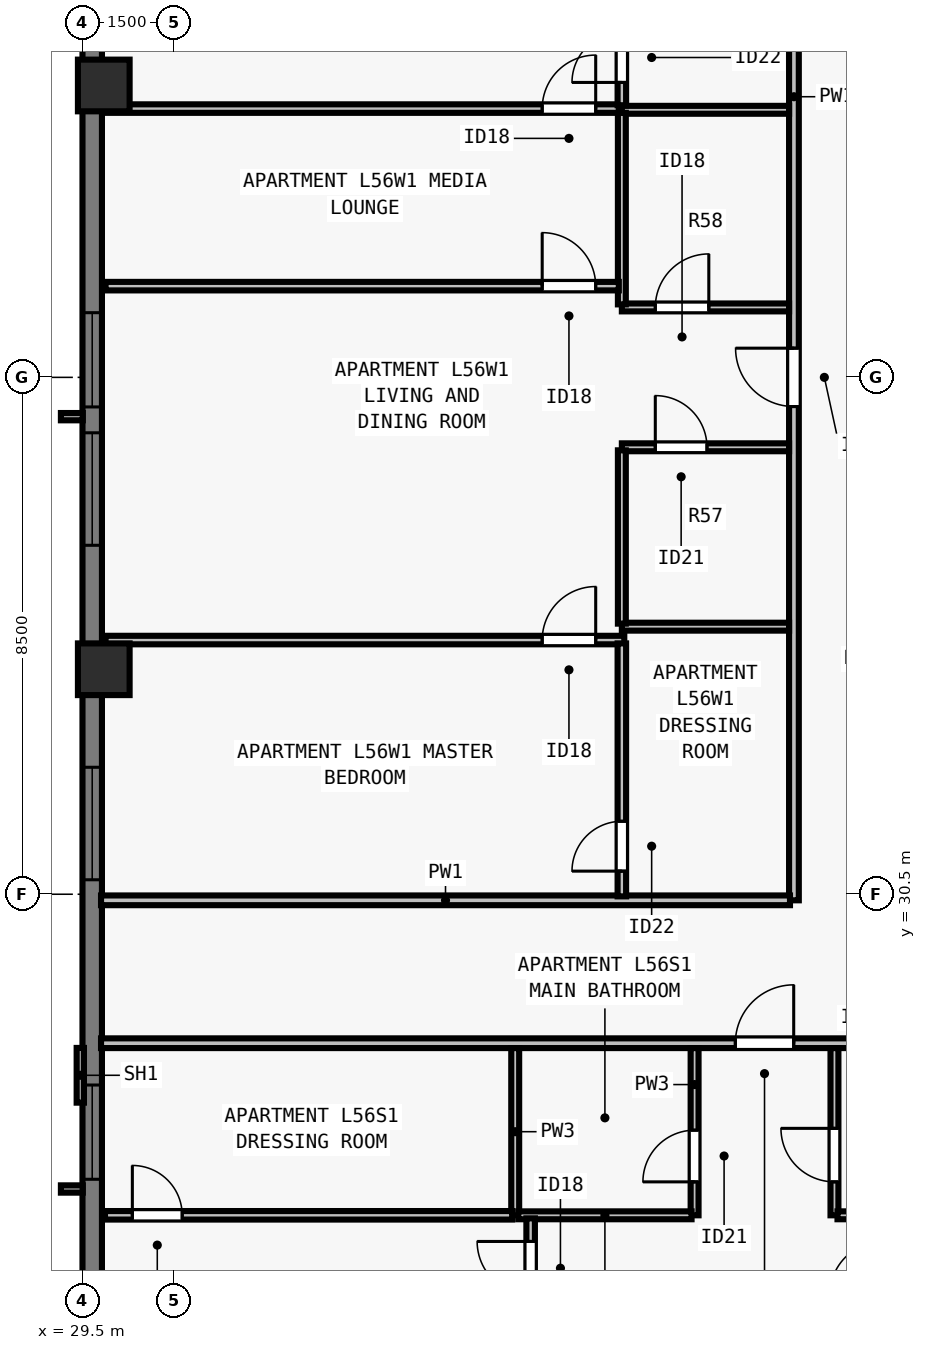
"""IFC4 building model, lengths in metres.
Left out: names, types, materials, properties, quantities, classifications, styles, units other than length and angle.
Written with IfcOpenShell. Run it as: python <this file> out.ifc"""

import sys

from ifc_helpers import new_model, si_unit, direction, frame, frame_2d, origin, origin_2d, place, context, subcontext, project, spatial, rectangle, extrude, element, fill, save


model = new_model("IFC4")
c1 = context("Model", 3, precision=1e-05, world=origin(), true_north=direction((0.0, 1.0)))
c2 = subcontext(c1, "Body", "Model", "MODEL_VIEW")
j1 = project(units=[si_unit("LENGTHUNIT", "METRE"), si_unit("PLANEANGLEUNIT", "RADIAN")], contexts=[c1])
p1 = place(None, origin())
s1 = spatial("IfcSite", under=j1, at=p1, CompositionType="ELEMENT")
p2 = place(p1, origin())
s2 = spatial("IfcBuilding", under=s1, at=p2, CompositionType="ELEMENT")
p3 = place(p2, frame((0.0, 0.0, 206.0)))
s3 = spatial("IfcBuildingStorey", under=s2, at=p3, CompositionType="ELEMENT", Elevation=206.0)
for number, where, z_axis, x_axis in (
    (1, (29.85, 43.8, 0.0), (0.0, 0.0, 1.0), (0.0, 1.0, 0.0)),
    (2, (29.85, 34.2, 0.0), (0.0, 0.0, 1.0), (0.0, 1.0, 0.0)),
):
    element("IfcColumn", number, at=place(p3, frame(where, z_axis=z_axis, x_axis=x_axis)), inside=s3, PredefinedType="COLUMN", context=c2, shape_type="SweptSolid", body=[
        extrude(rectangle(XDim=0.85, YDim=0.85, at=origin_2d()), origin(), (0.0, 0.0, 1.0), 3.5),
    ])
p4 = place(p3, frame((29.66, 21.5, 0.0), z_axis=(0.0, 0.0, 1.0), x_axis=(0.0, 1.0, 0.0)))
e3 = element("IfcWall", 3, at=p4, inside=s3, PredefinedType="SOLIDWALL", context=c2, shape_type="SweptSolid", body=[
    extrude(rectangle(XDim=34.702, YDim=0.32, at=frame_2d((17.351, 0.0))), origin(), (0.0, 0.0, 1.0), 3.29),
])
p5 = place(p4, frame((4.312, 0.0, 0.8)))
e4 = element("IfcOpeningElement", 4, at=p5, cuts=e3, PredefinedType="OPENING", context=c2, shape_type="SweptSolid", body=[
    extrude(rectangle(XDim=1.55, YDim=1.678, at=frame_2d((0.775, 0.839))), frame((0.0, 0.17, 0.0), z_axis=(0.0, -1.0, 0.0), x_axis=(1.0, 0.0, 0.0)), (0.0, 0.0, 1.0), 0.34),
])
p6 = place(p4, frame((9.238, 0.0, 0.8)))
e5 = element("IfcOpeningElement", 5, at=p6, cuts=e3, PredefinedType="OPENING", context=c2, shape_type="SweptSolid", body=[
    extrude(rectangle(XDim=1.85, YDim=1.678, at=frame_2d((0.925, 0.839))), frame((0.0, 0.17, 0.0), z_axis=(0.0, -1.0, 0.0), x_axis=(1.0, 0.0, 0.0)), (0.0, 0.0, 1.0), 0.34),
])
p7 = place(p4, frame((14.738, 0.0, 0.8)))
e6 = element("IfcOpeningElement", 6, at=p7, cuts=e3, PredefinedType="OPENING", context=c2, shape_type="SweptSolid", body=[
    extrude(rectangle(XDim=1.85, YDim=1.678, at=frame_2d((0.925, 0.839))), frame((0.0, 0.17, 0.0), z_axis=(0.0, -1.0, 0.0), x_axis=(1.0, 0.0, 0.0)), (0.0, 0.0, 1.0), 0.34),
])
p8 = place(p4, frame((17.014, 0.0, 0.8)))
e7 = element("IfcOpeningElement", 7, at=p8, cuts=e3, PredefinedType="OPENING", context=c2, shape_type="SweptSolid", body=[
    extrude(rectangle(XDim=1.55, YDim=1.678, at=frame_2d((0.775, 0.839))), frame((0.0, 0.17, 0.0), z_axis=(0.0, -1.0, 0.0), x_axis=(1.0, 0.0, 0.0)), (0.0, 0.0, 1.0), 0.34),
])
p9 = place(p4, frame((24.164, 0.0, 0.8)))
e8 = element("IfcOpeningElement", 8, at=p9, cuts=e3, PredefinedType="OPENING", context=c2, shape_type="SweptSolid", body=[
    extrude(rectangle(XDim=1.55, YDim=1.678, at=frame_2d((0.775, 0.839))), frame((0.0, 0.17, 0.0), z_axis=(0.0, -1.0, 0.0), x_axis=(1.0, 0.0, 0.0)), (0.0, 0.0, 1.0), 0.34),
])
p10 = place(p3, frame((29.805, 28.05, 0.0), z_axis=(0.0, 0.0, 1.0), x_axis=(1.0, 0.0, 0.0)))
e9 = element("IfcWall", 9, at=p10, inside=s3, PredefinedType="PARTITIONING", context=c2, shape_type="SweptSolid", body=[
    extrude(rectangle(XDim=44.39, YDim=0.16, at=frame_2d((22.195, 0.0))), origin(), (0.0, 0.0, 1.0), 2.958),
])
p11 = place(p10, frame((10.431, 0.0, 0.0)))
e10 = element("IfcOpeningElement", 10, at=p11, cuts=e9, PredefinedType="OPENING", context=c2, shape_type="SweptSolid", body=[
    extrude(rectangle(XDim=0.96, YDim=2.18, at=frame_2d((0.48, 1.09))), frame((0.0, 0.09, 0.0), z_axis=(0.0, -1.0, 0.0), x_axis=(1.0, 0.0, 0.0)), (0.0, 0.0, 1.0), 0.18),
])
p12 = place(p10, frame((32.511, 0.0, 0.0)))
e11 = element("IfcOpeningElement", 11, at=p12, cuts=e9, PredefinedType="OPENING", context=c2, shape_type="SweptSolid", body=[
    extrude(rectangle(XDim=0.96, YDim=2.18, at=frame_2d((0.48, 1.09))), frame((0.0, 0.09, 0.0), z_axis=(0.0, -1.0, 0.0), x_axis=(1.0, 0.0, 0.0)), (0.0, 0.0, 1.0), 0.18),
])
p13 = place(p3, frame((41.2, 30.4, 0.0), z_axis=(0.0, 0.0, 1.0), x_axis=(0.0, 1.0, 0.0)))
e12 = element("IfcWall", 12, at=p13, inside=s3, PredefinedType="PARTITIONING", context=c2, shape_type="SweptSolid", body=[
    extrude(rectangle(XDim=17.2, YDim=0.16, at=frame_2d((8.6, 0.0))), origin(), (0.0, 0.0, 1.0), 3.29),
])
p14 = place(p13, frame((8.12, 0.0, 0.0)))
e13 = element("IfcOpeningElement", 13, at=p14, cuts=e12, PredefinedType="OPENING", context=c2, shape_type="SweptSolid", body=[
    extrude(rectangle(XDim=0.96, YDim=2.18, at=frame_2d((0.48, 1.09))), frame((0.0, 0.09, 0.0), z_axis=(0.0, -1.0, 0.0), x_axis=(1.0, 0.0, 0.0)), (0.0, 0.0, 1.0), 0.18),
])
p15 = place(p3, frame((29.805, 30.4, 0.0), z_axis=(0.0, 0.0, 1.0), x_axis=(1.0, 0.0, 0.0)))
e14 = element("IfcWall", 14, at=p15, inside=s3, PredefinedType="PARTITIONING", context=c2, shape_type="SweptSolid", body=[
    extrude(rectangle(XDim=11.33, YDim=0.16, at=frame_2d((5.665, 0.0))), origin(), (0.0, 0.0, 1.0), 3.29),
])
p16 = place(p3, frame((36.616, 25.22, 0.0), z_axis=(0.0, 0.0, 1.0), x_axis=(0.0, 1.0, 0.0)))
e15 = element("IfcWall", 15, at=p16, inside=s3, PredefinedType="PLUMBINGWALL", context=c2, shape_type="SweptSolid", body=[
    extrude(rectangle(XDim=2.75, YDim=0.13, at=frame_2d((1.375, 0.0))), origin(), (0.0, 0.0, 1.0), 3.29),
])
p17 = place(p3, frame((39.566, 25.22, 0.0), z_axis=(0.0, 0.0, 1.0), x_axis=(0.0, 1.0, 0.0)))
e16 = element("IfcWall", 16, at=p17, inside=s3, PredefinedType="PLUMBINGWALL", context=c2, shape_type="SweptSolid", body=[
    extrude(rectangle(XDim=2.75, YDim=0.13, at=frame_2d((1.375, 0.0))), origin(), (0.0, 0.0, 1.0), 3.29),
])
p18 = place(p17, frame((0.55, 0.0, 0.0)))
e17 = element("IfcOpeningElement", 17, at=p18, cuts=e16, PredefinedType="OPENING", context=c2, shape_type="SweptSolid", body=[
    extrude(rectangle(XDim=0.85, YDim=2.08, at=frame_2d((0.425, 1.04))), frame((0.0, 0.075, 0.0), z_axis=(0.0, -1.0, 0.0), x_axis=(1.0, 0.0, 0.0)), (0.0, 0.0, 1.0), 0.15),
])
p19 = place(p3, frame((36.666, 25.22, 0.0), z_axis=(0.0, 0.0, 1.0), x_axis=(1.0, 0.0, 0.0)))
e18 = element("IfcWall", 18, at=p19, inside=s3, PredefinedType="PLUMBINGWALL", context=c2, shape_type="SweptSolid", body=[
    extrude(rectangle(XDim=2.85, YDim=0.13, at=frame_2d((1.425, 0.0))), origin(), (0.0, 0.0, 1.0), 3.29),
])
p20 = place(p3, frame((41.866, 25.22, 0.0), z_axis=(0.0, 0.0, 1.0), x_axis=(0.0, 1.0, 0.0)))
e19 = element("IfcWall", 19, at=p20, inside=s3, PredefinedType="PLUMBINGWALL", context=c2, shape_type="SweptSolid", body=[
    extrude(rectangle(XDim=2.75, YDim=0.13, at=frame_2d((1.375, 0.0))), origin(), (0.0, 0.0, 1.0), 2.573),
])
p21 = place(p20, frame((0.55, 0.0, 0.0)))
e20 = element("IfcOpeningElement", 20, at=p21, cuts=e19, PredefinedType="OPENING", context=c2, shape_type="SweptSolid", body=[
    extrude(rectangle(XDim=0.88, YDim=2.1, at=frame_2d((0.44, 1.05))), frame((0.0, 0.075, 0.0), z_axis=(0.0, -1.0, 0.0), x_axis=(1.0, 0.0, 0.0)), (0.0, 0.0, 1.0), 0.15),
])
p22 = place(p3, frame((41.916, 25.22, 0.0), z_axis=(0.0, 0.0, 1.0), x_axis=(1.0, 0.0, 0.0)))
e21 = element("IfcWall", 21, at=p22, inside=s3, PredefinedType="PLUMBINGWALL", context=c2, shape_type="SweptSolid", body=[
    extrude(rectangle(XDim=3.15, YDim=0.13, at=frame_2d((1.575, 0.0))), origin(), (0.0, 0.0, 1.0), 3.29),
])
p23 = place(p3, frame((36.87, 16.88, 0.0), z_axis=(0.0, 0.0, 1.0), x_axis=(0.0, 1.0, 0.0)))
e22 = element("IfcWall", 22, at=p23, inside=s3, PredefinedType="PARTITIONING", context=c2, shape_type="SweptSolid", body=[
    extrude(rectangle(XDim=8.29, YDim=0.14, at=frame_2d((4.145, 0.0))), origin(), (0.0, 0.0, 1.0), 2.573),
])
p24 = place(p23, frame((7.03, 0.0, 0.0)))
e23 = element("IfcOpeningElement", 23, at=p24, cuts=e22, PredefinedType="OPENING", context=c2, shape_type="SweptSolid", body=[
    extrude(rectangle(XDim=0.88, YDim=2.1, at=frame_2d((0.44, 1.05))), frame((0.0, 0.08, 0.0), z_axis=(0.0, -1.0, 0.0), x_axis=(1.0, 0.0, 0.0)), (0.0, 0.0, 1.0), 0.16),
])
p25 = place(p3, frame((29.87, 25.22, 0.0), z_axis=(0.0, 0.0, 1.0), x_axis=(1.0, 0.0, 0.0)))
e24 = element("IfcWall", 24, at=p25, inside=s3, PredefinedType="PARTITIONING", context=c2, shape_type="SweptSolid", body=[
    extrude(rectangle(XDim=6.696, YDim=0.14, at=frame_2d((3.348, 0.0))), origin(), (0.0, 0.0, 1.0), 2.958),
])
p26 = place(p25, frame((0.45, 0.0, 0.0)))
e25 = element("IfcOpeningElement", 25, at=p26, cuts=e24, PredefinedType="OPENING", context=c2, shape_type="SweptSolid", body=[
    extrude(rectangle(XDim=0.82, YDim=2.1, at=frame_2d((0.41, 1.05))), frame((0.0, 0.08, 0.0), z_axis=(0.0, -1.0, 0.0), x_axis=(1.0, 0.0, 0.0)), (0.0, 0.0, 1.0), 0.16),
])
p27 = place(p3, frame((38.37, 34.9, 0.0), z_axis=(0.0, 0.0, 1.0), x_axis=(1.0, 0.0, 0.0)))
e26 = element("IfcWall", 26, at=p27, inside=s3, PredefinedType="PLUMBINGWALL", context=c2, shape_type="SweptSolid", body=[
    extrude(rectangle(XDim=2.75, YDim=0.13, at=frame_2d((1.375, 0.0))), origin(), (0.0, 0.0, 1.0), 3.29),
])
p28 = place(p3, frame((38.37, 37.85, 0.0), z_axis=(0.0, 0.0, 1.0), x_axis=(1.0, 0.0, 0.0)))
e27 = element("IfcWall", 27, at=p28, inside=s3, PredefinedType="PLUMBINGWALL", context=c2, shape_type="SweptSolid", body=[
    extrude(rectangle(XDim=2.75, YDim=0.13, at=frame_2d((1.375, 0.0))), origin(), (0.0, 0.0, 1.0), 3.29),
])
p29 = place(p28, frame((0.55, 0.0, 0.0)))
e28 = element("IfcOpeningElement", 28, at=p29, cuts=e27, PredefinedType="OPENING", context=c2, shape_type="SweptSolid", body=[
    extrude(rectangle(XDim=0.85, YDim=2.08, at=frame_2d((0.425, 1.04))), frame((0.0, 0.075, 0.0), z_axis=(0.0, -1.0, 0.0), x_axis=(1.0, 0.0, 0.0)), (0.0, 0.0, 1.0), 0.15),
])
p30 = place(p3, frame((38.37, 34.95, 0.0), z_axis=(0.0, 0.0, 1.0), x_axis=(0.0, 1.0, 0.0)))
e29 = element("IfcWall", 29, at=p30, inside=s3, PredefinedType="PLUMBINGWALL", context=c2, shape_type="SweptSolid", body=[
    extrude(rectangle(XDim=2.85, YDim=0.13, at=frame_2d((1.425, 0.0))), origin(), (0.0, 0.0, 1.0), 3.29),
])
p31 = place(p3, frame((38.37, 43.4, 0.0), z_axis=(0.0, 0.0, 1.0), x_axis=(1.0, 0.0, 0.0)))
e30 = element("IfcWall", 30, at=p31, inside=s3, PredefinedType="PLUMBINGWALL", context=c2, shape_type="SweptSolid", body=[
    extrude(rectangle(XDim=2.75, YDim=0.13, at=frame_2d((1.375, 0.0))), origin(), (0.0, 0.0, 1.0), 2.958),
])
p32 = place(p3, frame((38.37, 40.15, 0.0), z_axis=(0.0, 0.0, 1.0), x_axis=(1.0, 0.0, 0.0)))
e31 = element("IfcWall", 31, at=p32, inside=s3, PredefinedType="PLUMBINGWALL", context=c2, shape_type="SweptSolid", body=[
    extrude(rectangle(XDim=2.75, YDim=0.13, at=frame_2d((1.375, 0.0))), origin(), (0.0, 0.0, 1.0), 3.29),
])
p33 = place(p32, frame((0.55, 0.0, 0.0)))
e32 = element("IfcOpeningElement", 32, at=p33, cuts=e31, PredefinedType="OPENING", context=c2, shape_type="SweptSolid", body=[
    extrude(rectangle(XDim=0.88, YDim=2.1, at=frame_2d((0.44, 1.05))), frame((0.0, 0.075, 0.0), z_axis=(0.0, -1.0, 0.0), x_axis=(1.0, 0.0, 0.0)), (0.0, 0.0, 1.0), 0.15),
])
p34 = place(p3, frame((38.37, 40.2, 0.0), z_axis=(0.0, 0.0, 1.0), x_axis=(0.0, 1.0, 0.0)))
e33 = element("IfcWall", 33, at=p34, inside=s3, PredefinedType="PLUMBINGWALL", context=c2, shape_type="SweptSolid", body=[
    extrude(rectangle(XDim=3.15, YDim=0.13, at=frame_2d((1.575, 0.0))), origin(), (0.0, 0.0, 1.0), 3.29),
])
p35 = place(p3, frame((29.88, 34.68, 0.0), z_axis=(0.0, 0.0, 1.0), x_axis=(1.0, 0.0, 0.0)))
e34 = element("IfcWall", 34, at=p35, inside=s3, PredefinedType="PARTITIONING", context=c2, shape_type="SweptSolid", body=[
    extrude(rectangle(XDim=8.53, YDim=0.14, at=frame_2d((4.265, 0.0))), origin(), (0.0, 0.0, 1.0), 2.958),
])
p36 = place(p35, frame((7.18, 0.0, 0.0)))
e35 = element("IfcOpeningElement", 35, at=p36, cuts=e34, PredefinedType="OPENING", context=c2, shape_type="SweptSolid", body=[
    extrude(rectangle(XDim=0.88, YDim=2.1, at=frame_2d((0.44, 1.05))), frame((0.0, 0.08, 0.0), z_axis=(0.0, -1.0, 0.0), x_axis=(1.0, 0.0, 0.0)), (0.0, 0.0, 1.0), 0.16),
])
p37 = place(p3, frame((38.37, 30.465, 0.0), z_axis=(0.0, 0.0, 1.0), x_axis=(0.0, 1.0, 0.0)))
e36 = element("IfcWall", 36, at=p37, inside=s3, PredefinedType="PARTITIONING", context=c2, shape_type="SweptSolid", body=[
    extrude(rectangle(XDim=4.16, YDim=0.14, at=frame_2d((2.08, 0.0))), origin(), (0.0, 0.0, 1.0), 3.29),
])
p38 = place(p37, frame((0.415, 0.0, 0.0)))
e37 = element("IfcOpeningElement", 37, at=p38, cuts=e36, PredefinedType="OPENING", context=c2, shape_type="SweptSolid", body=[
    extrude(rectangle(XDim=0.82, YDim=2.1, at=frame_2d((0.41, 1.05))), frame((0.0, 0.08, 0.0), z_axis=(0.0, -1.0, 0.0), x_axis=(1.0, 0.0, 0.0)), (0.0, 0.0, 1.0), 0.16),
])
p39 = place(p3, frame((29.88, 43.42, 0.0), z_axis=(0.0, 0.0, 1.0), x_axis=(1.0, 0.0, 0.0)))
e38 = element("IfcWall", 38, at=p39, inside=s3, PredefinedType="PARTITIONING", context=c2, shape_type="SweptSolid", body=[
    extrude(rectangle(XDim=8.44, YDim=0.14, at=frame_2d((4.22, 0.0))), origin(), (0.0, 0.0, 1.0), 3.29),
])
p40 = place(p39, frame((7.18, 0.0, 0.0)))
e39 = element("IfcOpeningElement", 39, at=p40, cuts=e38, PredefinedType="OPENING", context=c2, shape_type="SweptSolid", body=[
    extrude(rectangle(XDim=0.88, YDim=2.1, at=frame_2d((0.44, 1.05))), frame((0.0, 0.08, 0.0), z_axis=(0.0, -1.0, 0.0), x_axis=(1.0, 0.0, 0.0)), (0.0, 0.0, 1.0), 0.16),
])
p41 = place(p3, frame((38.37, 43.475, 0.0), z_axis=(0.0, 0.0, 1.0), x_axis=(0.0, 1.0, 0.0)))
e40 = element("IfcWall", 40, at=p41, inside=s3, PredefinedType="PARTITIONING", context=c2, shape_type="SweptSolid", body=[
    extrude(rectangle(XDim=4.06, YDim=0.14, at=frame_2d((2.03, 0.0))), origin(), (0.0, 0.0, 1.0), 3.29),
])
p42 = place(p41, frame((0.375, 0.0, 0.0)))
e41 = element("IfcOpeningElement", 41, at=p42, cuts=e40, PredefinedType="OPENING", context=c2, shape_type="SweptSolid", body=[
    extrude(rectangle(XDim=0.82, YDim=2.1, at=frame_2d((0.41, 1.05))), frame((0.0, 0.08, 0.0), z_axis=(0.0, -1.0, 0.0), x_axis=(1.0, 0.0, 0.0)), (0.0, 0.0, 1.0), 0.16),
])
p43 = place(p3, frame((29.88, 40.5, 0.0), z_axis=(0.0, 0.0, 1.0), x_axis=(1.0, 0.0, 0.0)))
e42 = element("IfcWall", 42, at=p43, inside=s3, PredefinedType="PARTITIONING", context=c2, shape_type="SweptSolid", body=[
    extrude(rectangle(XDim=8.44, YDim=0.14, at=frame_2d((4.22, 0.0))), origin(), (0.0, 0.0, 1.0), 2.958),
])
p44 = place(p43, frame((7.18, 0.0, 0.0)))
e43 = element("IfcOpeningElement", 43, at=p44, cuts=e42, PredefinedType="OPENING", context=c2, shape_type="SweptSolid", body=[
    extrude(rectangle(XDim=0.88, YDim=2.1, at=frame_2d((0.44, 1.05))), frame((0.0, 0.08, 0.0), z_axis=(0.0, -1.0, 0.0), x_axis=(1.0, 0.0, 0.0)), (0.0, 0.0, 1.0), 0.16),
])
p45 = place(p5, origin())
e44 = element("IfcWindow", 44, at=p45, inside=s3, PartitioningType="SINGLE_PANEL", PredefinedType="WINDOW", context=c2, shape_type="SweptSolid", body=[
    extrude(rectangle(XDim=1.55, YDim=1.678, at=frame_2d((0.775, 0.839))), frame((0.0, -0.05, 0.0), z_axis=(0.0, -1.0, 0.0), x_axis=(1.0, 0.0, 0.0)), (0.0, 0.0, 1.0), 0.06),
])
fill(e4, e44)
p46 = place(p6, origin())
e45 = element("IfcWindow", 45, at=p46, inside=s3, PartitioningType="SINGLE_PANEL", PredefinedType="WINDOW", context=c2, shape_type="SweptSolid", body=[
    extrude(rectangle(XDim=1.85, YDim=1.678, at=frame_2d((0.925, 0.839))), frame((0.0, -0.05, 0.0), z_axis=(0.0, -1.0, 0.0), x_axis=(1.0, 0.0, 0.0)), (0.0, 0.0, 1.0), 0.06),
])
fill(e5, e45)
p47 = place(p7, origin())
e46 = element("IfcWindow", 46, at=p47, inside=s3, PartitioningType="SINGLE_PANEL", PredefinedType="WINDOW", context=c2, shape_type="SweptSolid", body=[
    extrude(rectangle(XDim=1.85, YDim=1.678, at=frame_2d((0.925, 0.839))), frame((0.0, -0.05, 0.0), z_axis=(0.0, -1.0, 0.0), x_axis=(1.0, 0.0, 0.0)), (0.0, 0.0, 1.0), 0.06),
])
fill(e6, e46)
p48 = place(p8, origin())
e47 = element("IfcWindow", 47, at=p48, inside=s3, PartitioningType="SINGLE_PANEL", PredefinedType="WINDOW", context=c2, shape_type="SweptSolid", body=[
    extrude(rectangle(XDim=1.55, YDim=1.678, at=frame_2d((0.775, 0.839))), frame((0.0, -0.05, 0.0), z_axis=(0.0, -1.0, 0.0), x_axis=(1.0, 0.0, 0.0)), (0.0, 0.0, 1.0), 0.06),
])
fill(e7, e47)
p49 = place(p18, origin())
e48 = element("IfcDoor", 48, at=p49, inside=s3, OperationType="SINGLE_SWING_LEFT", PredefinedType="DOOR", context=c2, shape_type="SweptSolid", body=[
    extrude(rectangle(XDim=0.85, YDim=2.08, at=frame_2d((0.425, 1.04))), frame((0.0, 0.025, 0.0), z_axis=(0.0, -1.0, 0.0), x_axis=(1.0, 0.0, 0.0)), (0.0, 0.0, 1.0), 0.05),
])
fill(e17, e48)
p50 = place(p21, origin())
e49 = element("IfcDoor", 49, at=p50, inside=s3, OperationType="SINGLE_SWING_RIGHT", PredefinedType="DOOR", context=c2, shape_type="SweptSolid", body=[
    extrude(rectangle(XDim=0.88, YDim=2.1, at=frame_2d((0.44, 1.05))), frame((0.0, 0.025, 0.0), z_axis=(0.0, -1.0, 0.0), x_axis=(1.0, 0.0, 0.0)), (0.0, 0.0, 1.0), 0.05),
])
fill(e20, e49)
p51 = place(p26, origin())
e50 = element("IfcDoor", 50, at=p51, inside=s3, OperationType="SINGLE_SWING_LEFT", PredefinedType="DOOR", context=c2, shape_type="SweptSolid", body=[
    extrude(rectangle(XDim=0.82, YDim=2.1, at=frame_2d((0.41, 1.05))), frame((0.0, 0.025, 0.0), z_axis=(0.0, -1.0, 0.0), x_axis=(1.0, 0.0, 0.0)), (0.0, 0.0, 1.0), 0.05),
])
fill(e25, e50)
p52 = place(p24, origin())
e51 = element("IfcDoor", 51, at=p52, inside=s3, OperationType="SINGLE_SWING_RIGHT", PredefinedType="DOOR", context=c2, shape_type="SweptSolid", body=[
    extrude(rectangle(XDim=0.88, YDim=2.1, at=frame_2d((0.44, 1.05))), frame((0.0, 0.025, 0.0), z_axis=(0.0, -1.0, 0.0), x_axis=(1.0, 0.0, 0.0)), (0.0, 0.0, 1.0), 0.05),
])
fill(e23, e51)
p53 = place(p11, origin())
e52 = element("IfcDoor", 52, at=p53, inside=s3, OperationType="SINGLE_SWING_RIGHT", PredefinedType="DOOR", context=c2, shape_type="SweptSolid", body=[
    extrude(rectangle(XDim=0.96, YDim=2.18, at=frame_2d((0.48, 1.09))), frame((0.0, 0.025, 0.0), z_axis=(0.0, -1.0, 0.0), x_axis=(1.0, 0.0, 0.0)), (0.0, 0.0, 1.0), 0.05),
])
fill(e10, e52)
p54 = place(p29, origin())
e53 = element("IfcDoor", 53, at=p54, inside=s3, OperationType="SINGLE_SWING_LEFT", PredefinedType="DOOR", context=c2, shape_type="SweptSolid", body=[
    extrude(rectangle(XDim=0.85, YDim=2.08, at=frame_2d((0.425, 1.04))), frame((0.0, 0.025, 0.0), z_axis=(0.0, -1.0, 0.0), x_axis=(1.0, 0.0, 0.0)), (0.0, 0.0, 1.0), 0.05),
])
fill(e28, e53)
p55 = place(p33, origin())
e54 = element("IfcDoor", 54, at=p55, inside=s3, OperationType="SINGLE_SWING_RIGHT", PredefinedType="DOOR", context=c2, shape_type="SweptSolid", body=[
    extrude(rectangle(XDim=0.88, YDim=2.1, at=frame_2d((0.44, 1.05))), frame((0.0, 0.025, 0.0), z_axis=(0.0, -1.0, 0.0), x_axis=(1.0, 0.0, 0.0)), (0.0, 0.0, 1.0), 0.05),
])
fill(e32, e54)
p56 = place(p38, origin())
e55 = element("IfcDoor", 55, at=p56, inside=s3, OperationType="SINGLE_SWING_LEFT", PredefinedType="DOOR", context=c2, shape_type="SweptSolid", body=[
    extrude(rectangle(XDim=0.82, YDim=2.1, at=frame_2d((0.41, 1.05))), frame((0.0, 0.025, 0.0), z_axis=(0.0, -1.0, 0.0), x_axis=(1.0, 0.0, 0.0)), (0.0, 0.0, 1.0), 0.05),
])
fill(e37, e55)
p57 = place(p36, origin())
e56 = element("IfcDoor", 56, at=p57, inside=s3, OperationType="SINGLE_SWING_RIGHT", PredefinedType="DOOR", context=c2, shape_type="SweptSolid", body=[
    extrude(rectangle(XDim=0.88, YDim=2.1, at=frame_2d((0.44, 1.05))), frame((0.0, 0.025, 0.0), z_axis=(0.0, -1.0, 0.0), x_axis=(1.0, 0.0, 0.0)), (0.0, 0.0, 1.0), 0.05),
])
fill(e35, e56)
p58 = place(p42, origin())
e57 = element("IfcDoor", 57, at=p58, inside=s3, OperationType="SINGLE_SWING_LEFT", PredefinedType="DOOR", context=c2, shape_type="SweptSolid", body=[
    extrude(rectangle(XDim=0.82, YDim=2.1, at=frame_2d((0.41, 1.05))), frame((0.0, 0.025, 0.0), z_axis=(0.0, -1.0, 0.0), x_axis=(1.0, 0.0, 0.0)), (0.0, 0.0, 1.0), 0.05),
])
fill(e41, e57)
p59 = place(p40, origin())
e58 = element("IfcDoor", 58, at=p59, inside=s3, OperationType="SINGLE_SWING_RIGHT", PredefinedType="DOOR", context=c2, shape_type="SweptSolid", body=[
    extrude(rectangle(XDim=0.88, YDim=2.1, at=frame_2d((0.44, 1.05))), frame((0.0, 0.025, 0.0), z_axis=(0.0, -1.0, 0.0), x_axis=(1.0, 0.0, 0.0)), (0.0, 0.0, 1.0), 0.05),
])
fill(e39, e58)
p60 = place(p44, origin())
e59 = element("IfcDoor", 59, at=p60, inside=s3, OperationType="SINGLE_SWING_LEFT", PredefinedType="DOOR", context=c2, shape_type="SweptSolid", body=[
    extrude(rectangle(XDim=0.88, YDim=2.1, at=frame_2d((0.44, 1.05))), frame((0.0, 0.025, 0.0), z_axis=(0.0, -1.0, 0.0), x_axis=(1.0, 0.0, 0.0)), (0.0, 0.0, 1.0), 0.05),
])
fill(e43, e59)
p61 = place(p14, origin())
e60 = element("IfcDoor", 60, at=p61, inside=s3, OperationType="SINGLE_SWING_RIGHT", PredefinedType="DOOR", context=c2, shape_type="SweptSolid", body=[
    extrude(rectangle(XDim=0.96, YDim=2.18, at=frame_2d((0.48, 1.09))), frame((0.0, 0.025, 0.0), z_axis=(0.0, -1.0, 0.0), x_axis=(1.0, 0.0, 0.0)), (0.0, 0.0, 1.0), 0.05),
])
fill(e13, e60)
save(model, sys.argv[1])
